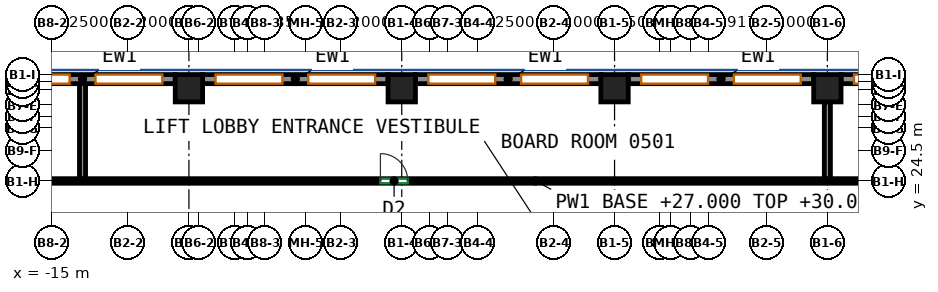
"""IFC4 building model, lengths in metres.
Left out: names, types, materials, properties, quantities, classifications, styles, units other than length and angle.
Written with IfcOpenShell. Run it as: python <this file> out.ifc"""

import sys

from ifc_helpers import new_model, si_unit, direction, frame, frame_2d, origin, origin_2d, place, context, subcontext, project, spatial, rectangle, extrude, source, transform, mapped, element, fill, save


model = new_model("IFC4")
c1 = context("Model", 3, precision=1e-05, world=origin(), true_north=direction((0.0, 1.0)))
c2 = subcontext(c1, "Body", "Model", "MODEL_VIEW")
j1 = project(units=[si_unit("LENGTHUNIT", "METRE"), si_unit("PLANEANGLEUNIT", "RADIAN")], contexts=[c1])
p1 = place(None, origin())
s1 = spatial("IfcSite", under=j1, at=p1, CompositionType="ELEMENT")
p2 = place(p1, origin())
s2 = spatial("IfcBuilding", under=s1, at=p2, CompositionType="ELEMENT")
p3 = place(p2, frame((0.0, 0.0, 27.0)))
s3 = spatial("IfcBuildingStorey", under=s2, at=p3, CompositionType="ELEMENT", Elevation=27.0)
m1 = source(origin(), c2, "Body", "SweptSolid", [
    extrude(rectangle(XDim=0.9, YDim=0.9, at=origin_2d()), origin(), (0.0, 0.0, 1.0), 3.72),
])
for number, where, z_axis, x_axis in (
    (1, (-10.5, 27.55, 0.0), (0.0, 0.0, 1.0), (1.0, 0.0, 0.0)),
    (2, (-3.5, 27.55, 0.0), (0.0, 0.0, 1.0), (1.0, 0.0, 0.0)),
    (3, (3.5, 27.55, 0.0), (0.0, 0.0, 1.0), (1.0, 0.0, 0.0)),
    (4, (10.5, 27.55, 0.0), (0.0, 0.0, 1.0), (1.0, 0.0, 0.0)),
):
    element("IfcColumn", number, at=place(p3, frame(where, z_axis=z_axis, x_axis=x_axis)), inside=s3, PredefinedType="COLUMN", context=c2, shape_type="MappedRepresentation", body=[
        mapped(m1, transform((0.0, 0.0, 0.0))),
    ])
m2 = source(origin(), c2, "Body", "SweptSolid", [
    extrude(rectangle(XDim=6.1, YDim=0.3, at=frame_2d((3.05, 0.0))), origin(), (0.0, 0.0, 1.0), 3.72),
])
p4 = place(p3, frame((17.05, 27.85, 0.0), z_axis=(0.0, 0.0, 1.0), x_axis=(-1.0, 0.0, 0.0)))
e5 = element("IfcWall", 5, at=p4, inside=s3, PredefinedType="SOLIDWALL", context=c2, shape_type="MappedRepresentation", body=[
    mapped(m2, transform((0.0, 0.0, 0.0))),
])
p5 = place(p4, frame((0.425, 0.0, 0.7)))
e6 = element("IfcOpeningElement", 6, at=p5, cuts=e5, PredefinedType="OPENING", context=c2, shape_type="SweptSolid", body=[
    extrude(rectangle(XDim=2.2, YDim=2.25, at=frame_2d((1.1, 1.125))), frame((0.0, 0.16, 0.0), z_axis=(0.0, -1.0, 0.0), x_axis=(1.0, 0.0, 0.0)), (0.0, 0.0, 1.0), 0.32),
])
p6 = place(p4, frame((3.475, 0.0, 0.7)))
e7 = element("IfcOpeningElement", 7, at=p6, cuts=e5, PredefinedType="OPENING", context=c2, shape_type="SweptSolid", body=[
    extrude(rectangle(XDim=2.2, YDim=2.25, at=frame_2d((1.1, 1.125))), frame((0.0, 0.16, 0.0), z_axis=(0.0, -1.0, 0.0), x_axis=(1.0, 0.0, 0.0)), (0.0, 0.0, 1.0), 0.32),
])
p7 = place(p3, frame((10.05, 27.85, 0.0), z_axis=(0.0, 0.0, 1.0), x_axis=(-1.0, 0.0, 0.0)))
e8 = element("IfcWall", 8, at=p7, inside=s3, PredefinedType="SOLIDWALL", context=c2, shape_type="MappedRepresentation", body=[
    mapped(m2, transform((0.0, 0.0, 0.0))),
])
p8 = place(p7, frame((0.425, 0.0, 0.7)))
e9 = element("IfcOpeningElement", 9, at=p8, cuts=e8, PredefinedType="OPENING", context=c2, shape_type="SweptSolid", body=[
    extrude(rectangle(XDim=2.2, YDim=2.25, at=frame_2d((1.1, 1.125))), frame((0.0, 0.16, 0.0), z_axis=(0.0, -1.0, 0.0), x_axis=(1.0, 0.0, 0.0)), (0.0, 0.0, 1.0), 0.32),
])
p9 = place(p7, frame((3.475, 0.0, 0.7)))
e10 = element("IfcOpeningElement", 10, at=p9, cuts=e8, PredefinedType="OPENING", context=c2, shape_type="SweptSolid", body=[
    extrude(rectangle(XDim=2.2, YDim=2.25, at=frame_2d((1.1, 1.125))), frame((0.0, 0.16, 0.0), z_axis=(0.0, -1.0, 0.0), x_axis=(1.0, 0.0, 0.0)), (0.0, 0.0, 1.0), 0.32),
])
p10 = place(p3, frame((3.05, 27.85, 0.0), z_axis=(0.0, 0.0, 1.0), x_axis=(-1.0, 0.0, 0.0)))
e11 = element("IfcWall", 11, at=p10, inside=s3, PredefinedType="SOLIDWALL", context=c2, shape_type="MappedRepresentation", body=[
    mapped(m2, transform((0.0, 0.0, 0.0))),
])
p11 = place(p10, frame((0.425, 0.0, 0.7)))
e12 = element("IfcOpeningElement", 12, at=p11, cuts=e11, PredefinedType="OPENING", context=c2, shape_type="SweptSolid", body=[
    extrude(rectangle(XDim=2.2, YDim=2.25, at=frame_2d((1.1, 1.125))), frame((0.0, 0.16, 0.0), z_axis=(0.0, -1.0, 0.0), x_axis=(1.0, 0.0, 0.0)), (0.0, 0.0, 1.0), 0.32),
])
p12 = place(p10, frame((3.475, 0.0, 0.7)))
e13 = element("IfcOpeningElement", 13, at=p12, cuts=e11, PredefinedType="OPENING", context=c2, shape_type="SweptSolid", body=[
    extrude(rectangle(XDim=2.2, YDim=2.25, at=frame_2d((1.1, 1.125))), frame((0.0, 0.16, 0.0), z_axis=(0.0, -1.0, 0.0), x_axis=(1.0, 0.0, 0.0)), (0.0, 0.0, 1.0), 0.32),
])
p13 = place(p3, frame((-3.95, 27.85, 0.0), z_axis=(0.0, 0.0, 1.0), x_axis=(-1.0, 0.0, 0.0)))
e14 = element("IfcWall", 14, at=p13, inside=s3, PredefinedType="SOLIDWALL", context=c2, shape_type="MappedRepresentation", body=[
    mapped(m2, transform((0.0, 0.0, 0.0))),
])
p14 = place(p13, frame((0.425, 0.0, 0.7)))
e15 = element("IfcOpeningElement", 15, at=p14, cuts=e14, PredefinedType="OPENING", context=c2, shape_type="SweptSolid", body=[
    extrude(rectangle(XDim=2.2, YDim=2.25, at=frame_2d((1.1, 1.125))), frame((0.0, 0.16, 0.0), z_axis=(0.0, -1.0, 0.0), x_axis=(1.0, 0.0, 0.0)), (0.0, 0.0, 1.0), 0.32),
])
p15 = place(p13, frame((3.475, 0.0, 0.7)))
e16 = element("IfcOpeningElement", 16, at=p15, cuts=e14, PredefinedType="OPENING", context=c2, shape_type="SweptSolid", body=[
    extrude(rectangle(XDim=2.2, YDim=2.25, at=frame_2d((1.1, 1.125))), frame((0.0, 0.16, 0.0), z_axis=(0.0, -1.0, 0.0), x_axis=(1.0, 0.0, 0.0)), (0.0, 0.0, 1.0), 0.32),
])
p16 = place(p3, frame((-10.95, 27.85, 0.0), z_axis=(0.0, 0.0, 1.0), x_axis=(-1.0, 0.0, 0.0)))
e17 = element("IfcWall", 17, at=p16, inside=s3, PredefinedType="SOLIDWALL", context=c2, shape_type="MappedRepresentation", body=[
    mapped(m2, transform((0.0, 0.0, 0.0))),
])
p17 = place(p16, frame((0.425, 0.0, 0.7)))
e18 = element("IfcOpeningElement", 18, at=p17, cuts=e17, PredefinedType="OPENING", context=c2, shape_type="SweptSolid", body=[
    extrude(rectangle(XDim=2.2, YDim=2.25, at=frame_2d((1.1, 1.125))), frame((0.0, 0.16, 0.0), z_axis=(0.0, -1.0, 0.0), x_axis=(1.0, 0.0, 0.0)), (0.0, 0.0, 1.0), 0.32),
])
p18 = place(p16, frame((3.475, 0.0, 0.7)))
e19 = element("IfcOpeningElement", 19, at=p18, cuts=e17, PredefinedType="OPENING", context=c2, shape_type="SweptSolid", body=[
    extrude(rectangle(XDim=2.2, YDim=2.25, at=frame_2d((1.1, 1.125))), frame((0.0, 0.16, 0.0), z_axis=(0.0, -1.0, 0.0), x_axis=(1.0, 0.0, 0.0)), (0.0, 0.0, 1.0), 0.32),
])
p19 = place(p3, frame((-19.275, 24.5, 0.0), z_axis=(0.0, 0.0, 1.0), x_axis=(1.0, 0.0, 0.0)))
e20 = element("IfcWall", 20, at=p19, inside=s3, PredefinedType="PARTITIONING", context=c2, shape_type="SweptSolid", body=[
    extrude(rectangle(XDim=40.35, YDim=0.15, at=frame_2d((20.175, 0.0))), origin(), (0.0, 0.0, 1.0), 3.07),
])
p20 = place(p19, frame((1.017, 0.0, 0.0)))
e21 = element("IfcOpeningElement", 21, at=p20, cuts=e20, PredefinedType="OPENING", context=c2, shape_type="SweptSolid", body=[
    extrude(rectangle(XDim=0.9, YDim=2.1, at=frame_2d((0.45, 1.05))), frame((0.0, 0.085, 0.0), z_axis=(0.0, -1.0, 0.0), x_axis=(1.0, 0.0, 0.0)), (0.0, 0.0, 1.0), 0.17),
])
p21 = place(p19, frame((15.073, 0.0, 0.0)))
e22 = element("IfcOpeningElement", 22, at=p21, cuts=e20, PredefinedType="OPENING", context=c2, shape_type="SweptSolid", body=[
    extrude(rectangle(XDim=0.9, YDim=2.1, at=frame_2d((0.45, 1.05))), frame((0.0, 0.085, 0.0), z_axis=(0.0, -1.0, 0.0), x_axis=(1.0, 0.0, 0.0)), (0.0, 0.0, 1.0), 0.17),
])
p22 = place(p19, frame((32.791, 0.0, 0.0)))
e23 = element("IfcOpeningElement", 23, at=p22, cuts=e20, PredefinedType="OPENING", context=c2, shape_type="SweptSolid", body=[
    extrude(rectangle(XDim=1.0, YDim=2.1, at=frame_2d((0.5, 1.05))), frame((0.0, 0.085, 0.0), z_axis=(0.0, -1.0, 0.0), x_axis=(1.0, 0.0, 0.0)), (0.0, 0.0, 1.0), 0.17),
])
p23 = place(p3, frame((10.5, 24.576, 0.0), z_axis=(0.0, 0.0, 1.0), x_axis=(0.0, 1.0, 0.0)))
e24 = element("IfcWall", 24, at=p23, inside=s3, PredefinedType="PARTITIONING", context=c2, shape_type="SweptSolid", body=[
    extrude(rectangle(XDim=2.524, YDim=0.2, at=frame_2d((1.262, 0.0))), origin(), (0.0, 0.0, 1.0), 3.72),
])
p24 = place(p3, frame((-14.0, 24.576, 0.0), z_axis=(0.0, 0.0, 1.0), x_axis=(0.0, 1.0, 0.0)))
e25 = element("IfcWall", 25, at=p24, inside=s3, PredefinedType="PARTITIONING", context=c2, shape_type="SweptSolid", body=[
    extrude(rectangle(XDim=3.174, YDim=0.2, at=frame_2d((1.587, 0.0))), origin(), (0.0, 0.0, 1.0), 3.72),
])
p25 = place(p6, origin())
e26 = element("IfcWindow", 26, at=p25, inside=s3, PartitioningType="SINGLE_PANEL", PredefinedType="WINDOW", context=c2, shape_type="SweptSolid", body=[
    extrude(rectangle(XDim=2.2, YDim=2.25, at=frame_2d((1.1, 1.125))), frame((0.0, 0.03, 0.0), z_axis=(0.0, -1.0, 0.0), x_axis=(1.0, 0.0, 0.0)), (0.0, 0.0, 1.0), 0.06),
])
fill(e7, e26)
p26 = place(p8, origin())
e27 = element("IfcWindow", 27, at=p26, inside=s3, PartitioningType="SINGLE_PANEL", PredefinedType="WINDOW", context=c2, shape_type="SweptSolid", body=[
    extrude(rectangle(XDim=2.2, YDim=2.25, at=frame_2d((1.1, 1.125))), frame((0.0, 0.03, 0.0), z_axis=(0.0, -1.0, 0.0), x_axis=(1.0, 0.0, 0.0)), (0.0, 0.0, 1.0), 0.06),
])
fill(e9, e27)
p27 = place(p9, origin())
e28 = element("IfcWindow", 28, at=p27, inside=s3, PartitioningType="SINGLE_PANEL", PredefinedType="WINDOW", context=c2, shape_type="SweptSolid", body=[
    extrude(rectangle(XDim=2.2, YDim=2.25, at=frame_2d((1.1, 1.125))), frame((0.0, 0.03, 0.0), z_axis=(0.0, -1.0, 0.0), x_axis=(1.0, 0.0, 0.0)), (0.0, 0.0, 1.0), 0.06),
])
fill(e10, e28)
p28 = place(p11, origin())
e29 = element("IfcWindow", 29, at=p28, inside=s3, PartitioningType="SINGLE_PANEL", PredefinedType="WINDOW", context=c2, shape_type="SweptSolid", body=[
    extrude(rectangle(XDim=2.2, YDim=2.25, at=frame_2d((1.1, 1.125))), frame((0.0, 0.03, 0.0), z_axis=(0.0, -1.0, 0.0), x_axis=(1.0, 0.0, 0.0)), (0.0, 0.0, 1.0), 0.06),
])
fill(e12, e29)
p29 = place(p12, origin())
e30 = element("IfcWindow", 30, at=p29, inside=s3, PartitioningType="SINGLE_PANEL", PredefinedType="WINDOW", context=c2, shape_type="SweptSolid", body=[
    extrude(rectangle(XDim=2.2, YDim=2.25, at=frame_2d((1.1, 1.125))), frame((0.0, 0.03, 0.0), z_axis=(0.0, -1.0, 0.0), x_axis=(1.0, 0.0, 0.0)), (0.0, 0.0, 1.0), 0.06),
])
fill(e13, e30)
p30 = place(p14, origin())
e31 = element("IfcWindow", 31, at=p30, inside=s3, PartitioningType="SINGLE_PANEL", PredefinedType="WINDOW", context=c2, shape_type="SweptSolid", body=[
    extrude(rectangle(XDim=2.2, YDim=2.25, at=frame_2d((1.1, 1.125))), frame((0.0, 0.03, 0.0), z_axis=(0.0, -1.0, 0.0), x_axis=(1.0, 0.0, 0.0)), (0.0, 0.0, 1.0), 0.06),
])
fill(e15, e31)
p31 = place(p15, origin())
e32 = element("IfcWindow", 32, at=p31, inside=s3, PartitioningType="SINGLE_PANEL", PredefinedType="WINDOW", context=c2, shape_type="SweptSolid", body=[
    extrude(rectangle(XDim=2.2, YDim=2.25, at=frame_2d((1.1, 1.125))), frame((0.0, 0.03, 0.0), z_axis=(0.0, -1.0, 0.0), x_axis=(1.0, 0.0, 0.0)), (0.0, 0.0, 1.0), 0.06),
])
fill(e16, e32)
p32 = place(p17, origin())
e33 = element("IfcWindow", 33, at=p32, inside=s3, PartitioningType="SINGLE_PANEL", PredefinedType="WINDOW", context=c2, shape_type="SweptSolid", body=[
    extrude(rectangle(XDim=2.2, YDim=2.25, at=frame_2d((1.1, 1.125))), frame((0.0, 0.03, 0.0), z_axis=(0.0, -1.0, 0.0), x_axis=(1.0, 0.0, 0.0)), (0.0, 0.0, 1.0), 0.06),
])
fill(e18, e33)
p33 = place(p18, origin())
e34 = element("IfcWindow", 34, at=p33, inside=s3, PartitioningType="SINGLE_PANEL", PredefinedType="WINDOW", context=c2, shape_type="SweptSolid", body=[
    extrude(rectangle(XDim=2.2, YDim=2.25, at=frame_2d((1.1, 1.125))), frame((0.0, 0.03, 0.0), z_axis=(0.0, -1.0, 0.0), x_axis=(1.0, 0.0, 0.0)), (0.0, 0.0, 1.0), 0.06),
])
fill(e19, e34)
p34 = place(p21, origin())
e35 = element("IfcDoor", 35, at=p34, inside=s3, OperationType="SINGLE_SWING_LEFT", PredefinedType="DOOR", context=c2, shape_type="SweptSolid", body=[
    extrude(rectangle(XDim=0.9, YDim=2.1, at=frame_2d((0.45, 1.05))), frame((0.0, 0.025, 0.0), z_axis=(0.0, -1.0, 0.0), x_axis=(1.0, 0.0, 0.0)), (0.0, 0.0, 1.0), 0.05),
])
fill(e22, e35)
save(model, sys.argv[1])
